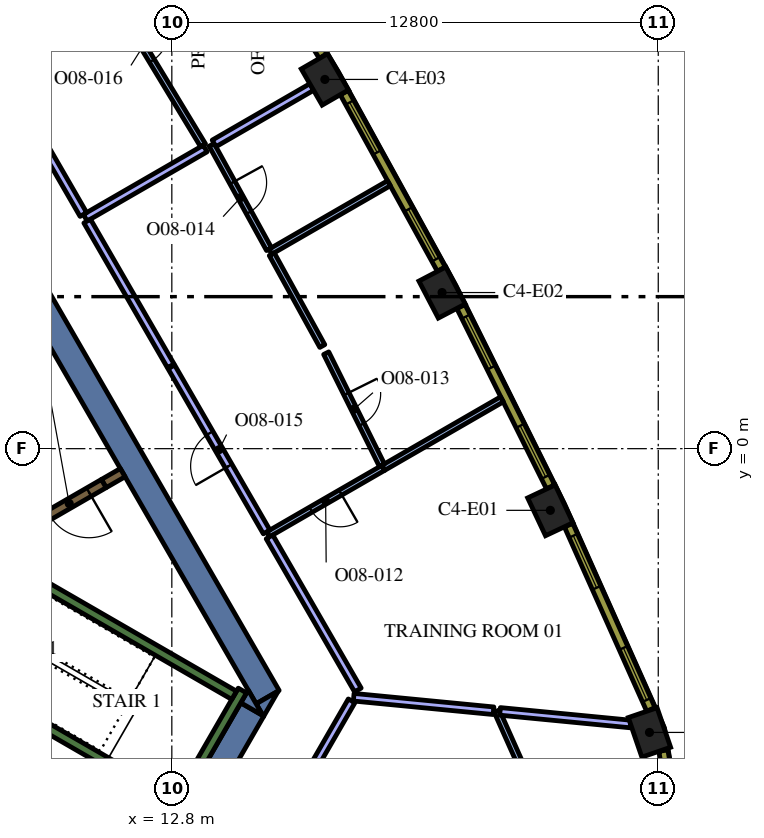
"""IFC4 building model, lengths in metres.
Left out: names, types, materials, properties, quantities, classifications, styles, units other than length and angle.
Written with IfcOpenShell. Run it as: python <this file> out.ifc"""

import sys

from ifc_helpers import new_model, si_unit, direction, frame, frame_2d, origin, origin_2d, place, context, subcontext, project, spatial, polyline, rectangle, outline, extrude, element, fill, save


model = new_model("IFC4")
c1 = context("Model", 3, precision=1e-05, world=origin(), true_north=direction((0.0, 1.0)))
c2 = subcontext(c1, "Body", "Model", "MODEL_VIEW")
j1 = project(units=[si_unit("LENGTHUNIT", "METRE"), si_unit("PLANEANGLEUNIT", "RADIAN")], contexts=[c1])
p1 = place(None, origin())
s1 = spatial("IfcSite", under=j1, at=p1, CompositionType="ELEMENT")
p2 = place(p1, origin())
s2 = spatial("IfcBuilding", under=s1, at=p2, CompositionType="ELEMENT")
p3 = place(p2, frame((0.0, 0.0, 231.0)))
s3 = spatial("IfcBuildingStorey", under=s2, at=p3, CompositionType="ELEMENT", Elevation=231.0)
for number, where, z_axis, x_axis in (
    (1, (25.369, -7.466, 0.0), (0.0, 0.0, 1.0), (-0.324, 0.946, 0.0)),
    (2, (22.76, -1.623, 0.0), (0.0, 0.0, 1.0), (-0.426, 0.905, 0.0)),
    (3, (19.912, 4.108, 0.0), (0.0, 0.0, 1.0), (-0.464, 0.886, 0.0)),
    (4, (16.827, 9.715, 0.0), (0.0, 0.0, 1.0), (-0.5, 0.866, 0.0)),
):
    element("IfcColumn", number, at=place(p3, frame(where, z_axis=z_axis, x_axis=x_axis)), inside=s3, PredefinedType="COLUMN", context=c2, shape_type="SweptSolid", body=[
        extrude(rectangle(XDim=1.1, YDim=0.8, at=origin_2d()), origin(), (0.0, 0.0, 1.0), 4.2),
    ])
p4 = place(p3, frame((9.085, 4.264, 0.0), z_axis=(0.0, 0.0, 1.0), x_axis=(0.499998082512, -0.866026510844, 0.0)))
e5 = element("IfcWall", 5, at=p4, inside=s3, PredefinedType="SOLIDWALL", context=c2, shape_type="SweptSolid", body=[
    extrude(rectangle(XDim=12.472, YDim=0.7, at=frame_2d((6.236, 0.0))), origin(), (0.0, 0.0, 1.0), 4.2),
])
p5 = place(p3, origin())
e6 = element("IfcWall", 6, at=p5, inside=s3, PredefinedType="SOLIDWALL", context=c2, shape_type="SweptSolid", body=[
    extrude(outline(polyline([(15.213, -7.05), (15.019, -6.714), (15.601, -6.378), (15.213, -7.05)])), origin(), (0.0, 0.0, 1.0), 4.2),
])
p6 = place(p3, frame((13.003, -10.179, 0.0), z_axis=(0.0, 0.0, 1.0), x_axis=(0.499972675833, 0.866041178825, 0.0)))
e7 = element("IfcWall", 7, at=p6, inside=s3, PredefinedType="SOLIDWALL", context=c2, shape_type="SweptSolid", body=[
    extrude(rectangle(XDim=3.829, YDim=0.7, at=frame_2d((1.915, 0.0))), origin(), (0.0, 0.0, 1.0), 4.2),
])
e8 = element("IfcWall", 8, at=p5, inside=s3, PredefinedType="SOLIDWALL", context=c2, shape_type="SweptSolid", body=[
    extrude(outline(polyline([(14.809, -6.35), (15.197, -7.022), (14.615, -6.686), (14.809, -6.35)])), origin(), (0.0, 0.0, 1.0), 4.2),
])
p7 = place(p3, frame((12.84, -9.511, 0.0), z_axis=(0.0, 0.0, 1.0), x_axis=(0.500048121057, 0.865997619297, 0.0)))
e9 = element("IfcWall", 9, at=p7, inside=s3, PredefinedType="SOLIDWALL", context=c2, shape_type="SweptSolid", body=[
    extrude(rectangle(XDim=3.634, YDim=0.25, at=frame_2d((1.817, 0.0))), origin(), (0.0, 0.0, 1.0), 4.2),
])
p8 = place(p3, frame((12.84, -9.261, 0.0), z_axis=(0.0, 0.0, 1.0), x_axis=(-0.866013990052, 0.500019768644, 0.0)))
e10 = element("IfcWall", 10, at=p8, inside=s3, PredefinedType="SOLIDWALL", context=c2, shape_type="SweptSolid", body=[
    extrude(rectangle(XDim=6.8, YDim=0.25, at=frame_2d((3.4, 0.0))), origin(), (0.0, 0.0, 1.0), 4.2),
])
p9 = place(p3, frame((8.334, -2.964, 0.0), z_axis=(0.0, 0.0, 1.0), x_axis=(0.866016039709, -0.500016218704, 0.0)))
e11 = element("IfcWall", 11, at=p9, inside=s3, PredefinedType="SOLIDWALL", context=c2, shape_type="SweptSolid", body=[
    extrude(rectangle(XDim=7.05, YDim=0.25, at=frame_2d((3.525, 0.0))), origin(), (0.0, 0.0, 1.0), 4.2),
])
p10 = place(p3, frame((11.507, -0.631, 0.0), z_axis=(0.0, 0.0, 1.0), x_axis=(-0.866093731455, -0.499881634324, 0.0)))
e12 = element("IfcWall", 12, at=p10, inside=s3, PredefinedType="SOLIDWALL", context=c2, shape_type="SweptSolid", body=[
    extrude(rectangle(XDim=0.575, YDim=0.25, at=frame_2d((0.288, 0.0))), origin(), (0.0, 0.0, 1.0), 4.2),
])
p11 = place(p3, frame((11.009, -0.919, 0.0), z_axis=(0.0, 0.0, 1.0), x_axis=(-0.866059744384, -0.49994051562, 0.0)))
e13 = element("IfcWall", 13, at=p11, inside=s3, PredefinedType="SOLIDWALL", context=c2, shape_type="SweptSolid", body=[
    extrude(rectangle(XDim=2.1, YDim=0.25, at=frame_2d((1.05, 0.0))), origin(), (0.0, 0.0, 1.0), 4.2),
])
p12 = place(p11, frame((0.45, 0.0, 0.0)))
e14 = element("IfcOpeningElement", 14, at=p12, cuts=e13, PredefinedType="OPENING", context=c2, shape_type="SweptSolid", body=[
    extrude(rectangle(XDim=1.2, YDim=2.1, at=frame_2d((0.6, 1.05))), frame((0.0, 0.135, 0.0), z_axis=(0.0, -1.0, 0.0), x_axis=(1.0, 0.0, 0.0)), (0.0, 0.0, 1.0), 0.27),
])
p13 = place(p3, frame((21.963, -8.276, 0.0), z_axis=(0.0, 0.0, 1.0), x_axis=(-0.407510458183, 0.913200540118, 0.0)))
e15 = element("IfcWall", 15, at=p13, inside=s3, PredefinedType="PARTITIONING", context=c2, shape_type="SweptSolid", body=[
    extrude(rectangle(XDim=1.502, YDim=0.15, at=frame_2d((0.751, 0.0))), origin(), (0.0, 0.0, 1.0), 3.45),
])
p14 = place(p3, frame((21.437, -6.913, 0.0), z_axis=(0.0, 0.0, 1.0), x_axis=(0.995357015301, -0.096251816042, 0.0)))
e16 = element("IfcWall", 16, at=p14, inside=s3, PredefinedType="PARTITIONING", context=c2, shape_type="SweptSolid", body=[
    extrude(rectangle(XDim=3.45, YDim=0.2, at=frame_2d((1.725, 0.0))), origin(), (0.0, 0.0, 1.0), 3.45),
])
p15 = place(p3, frame((17.586, -6.54, 0.0), z_axis=(0.0, 0.0, 1.0), x_axis=(0.995358181524, -0.096239755158, 0.0)))
e17 = element("IfcWall", 17, at=p15, inside=s3, PredefinedType="PARTITIONING", context=c2, shape_type="SweptSolid", body=[
    extrude(rectangle(XDim=3.696, YDim=0.2, at=frame_2d((1.848, 0.0))), origin(), (0.0, 0.0, 1.0), 3.45),
])
p16 = place(p3, frame((14.362, -12.124, 0.0), z_axis=(0.0, 0.0, 1.0), x_axis=(0.500017005442, 0.866015585465, 0.0)))
e18 = element("IfcWall", 18, at=p16, inside=s3, PredefinedType="PARTITIONING", context=c2, shape_type="SweptSolid", body=[
    extrude(rectangle(XDim=6.338, YDim=0.2, at=frame_2d((3.169, 0.0))), origin(), (0.0, 0.0, 1.0), 3.45),
])
p17 = place(p3, frame((18.36, -0.508, 0.0), z_axis=(0.0, 0.0, 1.0), x_axis=(0.866033589339, 0.499985821935, 0.0)))
e19 = element("IfcWall", 19, at=p17, inside=s3, PredefinedType="PARTITIONING", context=c2, shape_type="SweptSolid", body=[
    extrude(rectangle(XDim=3.611, YDim=0.15, at=frame_2d((1.805, 0.0))), origin(), (0.0, 0.0, 1.0), 3.45),
])
p18 = place(p3, frame((18.367, -0.504, 0.0), z_axis=(0.0, 0.0, 1.0), x_axis=(-0.866056812483, -0.499945594592, 0.0)))
e20 = element("IfcWall", 20, at=p18, inside=s3, PredefinedType="PARTITIONING", context=c2, shape_type="SweptSolid", body=[
    extrude(rectangle(XDim=3.504, YDim=0.15, at=frame_2d((1.752, 0.0))), origin(), (0.0, 0.0, 1.0), 3.45),
])
p19 = place(p18, frame((1.304, 0.0, 0.0)))
e21 = element("IfcOpeningElement", 21, at=p19, cuts=e20, PredefinedType="OPENING", context=c2, shape_type="SweptSolid", body=[
    extrude(rectangle(XDim=0.9, YDim=2.1, at=frame_2d((0.45, 1.05))), frame((0.0, 0.085, 0.0), z_axis=(0.0, -1.0, 0.0), x_axis=(1.0, 0.0, 0.0)), (0.0, 0.0, 1.0), 0.17),
])
p20 = place(p3, frame((17.696, -6.35, 0.0), z_axis=(0.0, 0.0, 1.0), x_axis=(-0.499976825411, 0.866038783226, 0.0)))
e22 = element("IfcWall", 22, at=p20, inside=s3, PredefinedType="PARTITIONING", context=c2, shape_type="SweptSolid", body=[
    extrude(rectangle(XDim=4.653, YDim=0.2, at=frame_2d((2.326, 0.0))), origin(), (0.0, 0.0, 1.0), 3.45),
])
p21 = place(p3, frame((15.394, 5.183, 0.0), z_axis=(0.0, 0.0, 1.0), x_axis=(0.866039935929, 0.499974828743, 0.0)))
e23 = element("IfcWall", 23, at=p21, inside=s3, PredefinedType="PARTITIONING", context=c2, shape_type="SweptSolid", body=[
    extrude(rectangle(XDim=3.601, YDim=0.15, at=frame_2d((1.8, 0.0))), origin(), (0.0, 0.0, 1.0), 3.45),
])
p22 = place(p3, frame((16.863, 2.513, 0.0), z_axis=(0.0, 0.0, 1.0), x_axis=(0.445197589821, -0.895432357031, 0.0)))
e24 = element("IfcWall", 24, at=p22, inside=s3, PredefinedType="PARTITIONING", context=c2, shape_type="SweptSolid", body=[
    extrude(rectangle(XDim=3.296, YDim=0.15, at=frame_2d((1.648, 0.0))), origin(), (0.0, 0.0, 1.0), 3.45),
])
p23 = place(p22, frame((1.196, 0.0, 0.0)))
e25 = element("IfcOpeningElement", 25, at=p23, cuts=e24, PredefinedType="OPENING", context=c2, shape_type="SweptSolid", body=[
    extrude(rectangle(XDim=0.9, YDim=2.1, at=frame_2d((0.45, 1.05))), frame((0.0, 0.085, 0.0), z_axis=(0.0, -1.0, 0.0), x_axis=(1.0, 0.0, 0.0)), (0.0, 0.0, 1.0), 0.17),
])
p24 = place(p3, frame((16.76, 2.7, 0.0), z_axis=(0.0, 0.0, 1.0), x_axis=(-0.481888167687, 0.876232728128, 0.0)))
e26 = element("IfcWall", 26, at=p24, inside=s3, PredefinedType="PARTITIONING", context=c2, shape_type="SweptSolid", body=[
    extrude(rectangle(XDim=2.758, YDim=0.15, at=frame_2d((1.379, 0.0))), origin(), (0.0, 0.0, 1.0), 3.45),
])
p25 = place(p3, frame((13.848, 7.995, 0.0), z_axis=(0.0, 0.0, 1.0), x_axis=(0.481894826099, -0.876229066272, 0.0)))
e27 = element("IfcWall", 27, at=p25, inside=s3, PredefinedType="PARTITIONING", context=c2, shape_type="SweptSolid", body=[
    extrude(rectangle(XDim=3.134, YDim=0.15, at=frame_2d((1.567, 0.0))), origin(), (0.0, 0.0, 1.0), 3.45),
])
p26 = place(p25, frame((1.134, 0.0, 0.0)))
e28 = element("IfcOpeningElement", 28, at=p26, cuts=e27, PredefinedType="OPENING", context=c2, shape_type="SweptSolid", body=[
    extrude(rectangle(XDim=0.9, YDim=2.1, at=frame_2d((0.45, 1.05))), frame((0.0, 0.085, 0.0), z_axis=(0.0, -1.0, 0.0), x_axis=(1.0, 0.0, 0.0)), (0.0, 0.0, 1.0), 0.17),
])
p27 = place(p3, frame((13.913, 8.032, 0.0), z_axis=(0.0, 0.0, 1.0), x_axis=(0.866015594979, 0.500016988964, 0.0)))
e29 = element("IfcWall", 29, at=p27, inside=s3, PredefinedType="PARTITIONING", context=c2, shape_type="SweptSolid", body=[
    extrude(rectangle(XDim=2.966, YDim=0.2, at=frame_2d((1.483, 0.0))), origin(), (0.0, 0.0, 1.0), 3.45),
])
p28 = place(p3, frame((10.522, 6.075, 0.0), z_axis=(0.0, 0.0, 1.0), x_axis=(0.866003708037, 0.500037576254, 0.0)))
e30 = element("IfcWall", 30, at=p28, inside=s3, PredefinedType="PARTITIONING", context=c2, shape_type="SweptSolid", body=[
    extrude(rectangle(XDim=3.644, YDim=0.2, at=frame_2d((1.822, 0.0))), origin(), (0.0, 0.0, 1.0), 3.45),
])
p29 = place(p3, frame((12.772, 2.178, 0.0), z_axis=(0.0, 0.0, 1.0), x_axis=(-0.50001224981, 0.866018331238, 0.0)))
e31 = element("IfcWall", 31, at=p29, inside=s3, PredefinedType="PARTITIONING", context=c2, shape_type="SweptSolid", body=[
    extrude(rectangle(XDim=4.4, YDim=0.2, at=frame_2d((2.2, 0.0))), origin(), (0.0, 0.0, 1.0), 3.45),
])
p30 = place(p3, frame((15.295, -2.191, 0.0), z_axis=(0.0, 0.0, 1.0), x_axis=(-0.500039923732, 0.86600235258, 0.0)))
e32 = element("IfcWall", 32, at=p30, inside=s3, PredefinedType="PARTITIONING", context=c2, shape_type="SweptSolid", body=[
    extrude(rectangle(XDim=5.015, YDim=0.2, at=frame_2d((2.507, 0.0))), origin(), (0.0, 0.0, 1.0), 3.45),
])
p31 = place(p30, frame((2.0, 0.0, 0.0)))
e33 = element("IfcOpeningElement", 33, at=p31, cuts=e32, PredefinedType="OPENING", context=c2, shape_type="SweptSolid", body=[
    extrude(rectangle(XDim=1.0, YDim=2.1, at=frame_2d((0.5, 1.05))), frame((0.0, 0.11, 0.0), z_axis=(0.0, -1.0, 0.0), x_axis=(1.0, 0.0, 0.0)), (0.0, 0.0, 1.0), 0.22),
])
p32 = place(p3, frame((10.439, 13.24, 0.0), z_axis=(0.0, 0.0, 1.0), x_axis=(0.517837859082, -0.855478785068, 0.0)))
e34 = element("IfcWall", 34, at=p32, inside=s3, PredefinedType="PARTITIONING", context=c2, shape_type="SweptSolid", body=[
    extrude(rectangle(XDim=6.148, YDim=0.15, at=frame_2d((3.074, 0.0))), origin(), (0.0, 0.0, 1.0), 3.45),
])
p33 = place(p32, frame((2.648, 0.0, 0.0)))
e35 = element("IfcOpeningElement", 35, at=p33, cuts=e34, PredefinedType="OPENING", context=c2, shape_type="SweptSolid", body=[
    extrude(rectangle(XDim=0.9, YDim=2.1, at=frame_2d((0.45, 1.05))), frame((0.0, 0.085, 0.0), z_axis=(0.0, -1.0, 0.0), x_axis=(1.0, 0.0, 0.0)), (0.0, 0.0, 1.0), 0.17),
])
p34 = place(p3, frame((10.472, 6.162, 0.0), z_axis=(0.0, 0.0, 1.0), x_axis=(-0.499988222896, 0.866032203192, 0.0)))
e36 = element("IfcWall", 36, at=p34, inside=s3, PredefinedType="PARTITIONING", context=c2, shape_type="SweptSolid", body=[
    extrude(rectangle(XDim=4.4, YDim=0.2, at=frame_2d((2.2, 0.0))), origin(), (0.0, 0.0, 1.0), 3.45),
])
p35 = place(p3, frame((26.172, -10.517, 0.0), z_axis=(0.0, 0.0, 1.0), x_axis=(-0.167660055546, 0.985844869021, 0.0)))
e37 = element("IfcWall", 37, at=p35, inside=s3, PredefinedType="SOLIDWALL", context=c2, shape_type="SweptSolid", body=[
    extrude(rectangle(XDim=2.609, YDim=0.24, at=frame_2d((1.305, 0.0))), origin(), (0.0, 0.0, 1.0), 3.95),
])
p36 = place(p35, frame((0.805, 0.0, 0.9)))
e38 = element("IfcOpeningElement", 38, at=p36, cuts=e37, PredefinedType="OPENING", context=c2, shape_type="SweptSolid", body=[
    extrude(rectangle(XDim=1.0, YDim=2.55, at=frame_2d((0.5, 1.275))), frame((0.0, 0.13, 0.0), z_axis=(0.0, -1.0, 0.0), x_axis=(1.0, 0.0, 0.0)), (0.0, 0.0, 1.0), 0.26),
])
p37 = place(p3, frame((25.405, -6.861, 0.0), z_axis=(0.0, 0.0, 1.0), x_axis=(-0.407579651789, 0.913169659728, 0.0)))
e39 = element("IfcWall", 39, at=p37, inside=s3, PredefinedType="SOLIDWALL", context=c2, shape_type="SweptSolid", body=[
    extrude(rectangle(XDim=5.311, YDim=0.24, at=frame_2d((2.655, 0.0))), origin(), (0.0, 0.0, 1.0), 3.95),
])
p38 = place(p37, frame((0.271, 0.0, 0.9)))
e40 = element("IfcOpeningElement", 40, at=p38, cuts=e39, PredefinedType="OPENING", context=c2, shape_type="SweptSolid", body=[
    extrude(rectangle(XDim=1.5, YDim=2.55, at=frame_2d((0.75, 1.275))), frame((0.0, 0.13, 0.0), z_axis=(0.0, -1.0, 0.0), x_axis=(1.0, 0.0, 0.0)), (0.0, 0.0, 1.0), 0.26),
])
p39 = place(p37, frame((3.504, 0.0, 0.9)))
e41 = element("IfcOpeningElement", 41, at=p39, cuts=e39, PredefinedType="OPENING", context=c2, shape_type="SweptSolid", body=[
    extrude(rectangle(XDim=1.5, YDim=2.55, at=frame_2d((0.75, 1.275))), frame((0.0, 0.13, 0.0), z_axis=(0.0, -1.0, 0.0), x_axis=(1.0, 0.0, 0.0)), (0.0, 0.0, 1.0), 0.26),
])
p40 = place(p3, frame((22.766, -1.005, 0.0), z_axis=(0.0, 0.0, 1.0), x_axis=(-0.445129582031, 0.895466166419, 0.0)))
e42 = element("IfcWall", 42, at=p40, inside=s3, PredefinedType="SOLIDWALL", context=c2, shape_type="SweptSolid", body=[
    extrude(rectangle(XDim=5.298, YDim=0.24, at=frame_2d((2.649, 0.0))), origin(), (0.0, 0.0, 1.0), 3.95),
])
p41 = place(p40, frame((0.295, 0.0, 0.9)))
e43 = element("IfcOpeningElement", 43, at=p41, cuts=e42, PredefinedType="OPENING", context=c2, shape_type="SweptSolid", body=[
    extrude(rectangle(XDim=1.5, YDim=2.55, at=frame_2d((0.75, 1.275))), frame((0.0, 0.13, 0.0), z_axis=(0.0, -1.0, 0.0), x_axis=(1.0, 0.0, 0.0)), (0.0, 0.0, 1.0), 0.26),
])
p42 = place(p40, frame((3.504, 0.0, 0.9)))
e44 = element("IfcOpeningElement", 44, at=p42, cuts=e42, PredefinedType="OPENING", context=c2, shape_type="SweptSolid", body=[
    extrude(rectangle(XDim=1.5, YDim=2.55, at=frame_2d((0.75, 1.275))), frame((0.0, 0.13, 0.0), z_axis=(0.0, -1.0, 0.0), x_axis=(1.0, 0.0, 0.0)), (0.0, 0.0, 1.0), 0.26),
])
p43 = place(p3, frame((19.892, 4.725, 0.0), z_axis=(0.0, 0.0, 1.0), x_axis=(-0.481925825015, 0.876212017256, 0.0)))
e45 = element("IfcWall", 45, at=p43, inside=s3, PredefinedType="SOLIDWALL", context=c2, shape_type="SweptSolid", body=[
    extrude(rectangle(XDim=5.299, YDim=0.24, at=frame_2d((2.649, 0.0))), origin(), (0.0, 0.0, 1.0), 3.95),
])
p44 = place(p43, frame((0.295, 0.0, 0.9)))
e46 = element("IfcOpeningElement", 46, at=p44, cuts=e45, PredefinedType="OPENING", context=c2, shape_type="SweptSolid", body=[
    extrude(rectangle(XDim=1.5, YDim=2.55, at=frame_2d((0.75, 1.275))), frame((0.0, 0.13, 0.0), z_axis=(0.0, -1.0, 0.0), x_axis=(1.0, 0.0, 0.0)), (0.0, 0.0, 1.0), 0.26),
])
p45 = place(p43, frame((3.504, 0.0, 0.9)))
e47 = element("IfcOpeningElement", 47, at=p45, cuts=e45, PredefinedType="OPENING", context=c2, shape_type="SweptSolid", body=[
    extrude(rectangle(XDim=1.5, YDim=2.55, at=frame_2d((0.75, 1.275))), frame((0.0, 0.13, 0.0), z_axis=(0.0, -1.0, 0.0), x_axis=(1.0, 0.0, 0.0)), (0.0, 0.0, 1.0), 0.26),
])
p46 = place(p3, frame((16.782, 10.331, 0.0), z_axis=(0.0, 0.0, 1.0), x_axis=(-0.517846166225, 0.855473756538, 0.0)))
e48 = element("IfcWall", 48, at=p46, inside=s3, PredefinedType="SOLIDWALL", context=c2, shape_type="SweptSolid", body=[
    extrude(rectangle(XDim=5.298, YDim=0.24, at=frame_2d((2.649, 0.0))), origin(), (0.0, 0.0, 1.0), 3.95),
])
p47 = place(p46, frame((0.294, 0.0, 0.9)))
e49 = element("IfcOpeningElement", 49, at=p47, cuts=e48, PredefinedType="OPENING", context=c2, shape_type="SweptSolid", body=[
    extrude(rectangle(XDim=1.5, YDim=2.55, at=frame_2d((0.75, 1.275))), frame((0.0, 0.13, 0.0), z_axis=(0.0, -1.0, 0.0), x_axis=(1.0, 0.0, 0.0)), (0.0, 0.0, 1.0), 0.26),
])
p48 = place(p46, frame((3.504, 0.0, 0.9)))
e50 = element("IfcOpeningElement", 50, at=p48, cuts=e48, PredefinedType="OPENING", context=c2, shape_type="SweptSolid", body=[
    extrude(rectangle(XDim=1.5, YDim=2.55, at=frame_2d((0.75, 1.275))), frame((0.0, 0.13, 0.0), z_axis=(0.0, -1.0, 0.0), x_axis=(1.0, 0.0, 0.0)), (0.0, 0.0, 1.0), 0.26),
])
p49 = place(p12, origin())
e51 = element("IfcDoor", 51, at=p49, inside=s3, OperationType="SINGLE_SWING_LEFT", PredefinedType="DOOR", context=c2, shape_type="SweptSolid", body=[
    extrude(rectangle(XDim=1.2, YDim=2.1, at=frame_2d((0.6, 1.05))), frame((0.0, 0.025, 0.0), z_axis=(0.0, -1.0, 0.0), x_axis=(1.0, 0.0, 0.0)), (0.0, 0.0, 1.0), 0.05),
])
fill(e14, e51)
p50 = place(p19, origin())
e52 = element("IfcDoor", 52, at=p50, inside=s3, OperationType="SINGLE_SWING_RIGHT", PredefinedType="DOOR", context=c2, shape_type="SweptSolid", body=[
    extrude(rectangle(XDim=0.9, YDim=2.1, at=frame_2d((0.45, 1.05))), frame((0.0, 0.025, 0.0), z_axis=(0.0, -1.0, 0.0), x_axis=(1.0, 0.0, 0.0)), (0.0, 0.0, 1.0), 0.05),
])
fill(e21, e52)
p51 = place(p23, origin())
e53 = element("IfcDoor", 53, at=p51, inside=s3, OperationType="SINGLE_SWING_LEFT", PredefinedType="DOOR", context=c2, shape_type="SweptSolid", body=[
    extrude(rectangle(XDim=0.9, YDim=2.1, at=frame_2d((0.45, 1.05))), frame((0.0, 0.025, 0.0), z_axis=(0.0, -1.0, 0.0), x_axis=(1.0, 0.0, 0.0)), (0.0, 0.0, 1.0), 0.05),
])
fill(e25, e53)
p52 = place(p26, origin())
e54 = element("IfcDoor", 54, at=p52, inside=s3, OperationType="SINGLE_SWING_RIGHT", PredefinedType="DOOR", context=c2, shape_type="SweptSolid", body=[
    extrude(rectangle(XDim=0.9, YDim=2.1, at=frame_2d((0.45, 1.05))), frame((0.0, 0.025, 0.0), z_axis=(0.0, -1.0, 0.0), x_axis=(1.0, 0.0, 0.0)), (0.0, 0.0, 1.0), 0.05),
])
fill(e28, e54)
p53 = place(p31, origin())
e55 = element("IfcDoor", 55, at=p53, inside=s3, OperationType="SINGLE_SWING_LEFT", PredefinedType="DOOR", context=c2, shape_type="SweptSolid", body=[
    extrude(rectangle(XDim=1.0, YDim=2.1, at=frame_2d((0.5, 1.05))), frame((0.0, 0.025, 0.0), z_axis=(0.0, -1.0, 0.0), x_axis=(1.0, 0.0, 0.0)), (0.0, 0.0, 1.0), 0.05),
])
fill(e33, e55)
p54 = place(p33, origin())
e56 = element("IfcDoor", 56, at=p54, inside=s3, OperationType="SINGLE_SWING_RIGHT", PredefinedType="DOOR", context=c2, shape_type="SweptSolid", body=[
    extrude(rectangle(XDim=0.9, YDim=2.1, at=frame_2d((0.45, 1.05))), frame((0.0, 0.025, 0.0), z_axis=(0.0, -1.0, 0.0), x_axis=(1.0, 0.0, 0.0)), (0.0, 0.0, 1.0), 0.05),
])
fill(e35, e56)
p55 = place(p38, origin())
e57 = element("IfcWindow", 57, at=p55, inside=s3, PartitioningType="SINGLE_PANEL", PredefinedType="WINDOW", context=c2, shape_type="SweptSolid", body=[
    extrude(rectangle(XDim=1.5, YDim=2.55, at=frame_2d((0.75, 1.275))), frame((0.0, 0.04, 0.0), z_axis=(0.0, -1.0, 0.0), x_axis=(1.0, 0.0, 0.0)), (0.0, 0.0, 1.0), 0.06),
])
fill(e40, e57)
p56 = place(p39, origin())
e58 = element("IfcWindow", 58, at=p56, inside=s3, PartitioningType="SINGLE_PANEL", PredefinedType="WINDOW", context=c2, shape_type="SweptSolid", body=[
    extrude(rectangle(XDim=1.5, YDim=2.55, at=frame_2d((0.75, 1.275))), frame((0.0, 0.04, 0.0), z_axis=(0.0, -1.0, 0.0), x_axis=(1.0, 0.0, 0.0)), (0.0, 0.0, 1.0), 0.06),
])
fill(e41, e58)
p57 = place(p41, origin())
e59 = element("IfcWindow", 59, at=p57, inside=s3, PartitioningType="SINGLE_PANEL", PredefinedType="WINDOW", context=c2, shape_type="SweptSolid", body=[
    extrude(rectangle(XDim=1.5, YDim=2.55, at=frame_2d((0.75, 1.275))), frame((0.0, 0.04, 0.0), z_axis=(0.0, -1.0, 0.0), x_axis=(1.0, 0.0, 0.0)), (0.0, 0.0, 1.0), 0.06),
])
fill(e43, e59)
p58 = place(p42, origin())
e60 = element("IfcWindow", 60, at=p58, inside=s3, PartitioningType="SINGLE_PANEL", PredefinedType="WINDOW", context=c2, shape_type="SweptSolid", body=[
    extrude(rectangle(XDim=1.5, YDim=2.55, at=frame_2d((0.75, 1.275))), frame((0.0, 0.04, 0.0), z_axis=(0.0, -1.0, 0.0), x_axis=(1.0, 0.0, 0.0)), (0.0, 0.0, 1.0), 0.06),
])
fill(e44, e60)
p59 = place(p44, origin())
e61 = element("IfcWindow", 61, at=p59, inside=s3, PartitioningType="SINGLE_PANEL", PredefinedType="WINDOW", context=c2, shape_type="SweptSolid", body=[
    extrude(rectangle(XDim=1.5, YDim=2.55, at=frame_2d((0.75, 1.275))), frame((0.0, 0.04, 0.0), z_axis=(0.0, -1.0, 0.0), x_axis=(1.0, 0.0, 0.0)), (0.0, 0.0, 1.0), 0.06),
])
fill(e46, e61)
p60 = place(p45, origin())
e62 = element("IfcWindow", 62, at=p60, inside=s3, PartitioningType="SINGLE_PANEL", PredefinedType="WINDOW", context=c2, shape_type="SweptSolid", body=[
    extrude(rectangle(XDim=1.5, YDim=2.55, at=frame_2d((0.75, 1.275))), frame((0.0, 0.04, 0.0), z_axis=(0.0, -1.0, 0.0), x_axis=(1.0, 0.0, 0.0)), (0.0, 0.0, 1.0), 0.06),
])
fill(e47, e62)
save(model, sys.argv[1])
